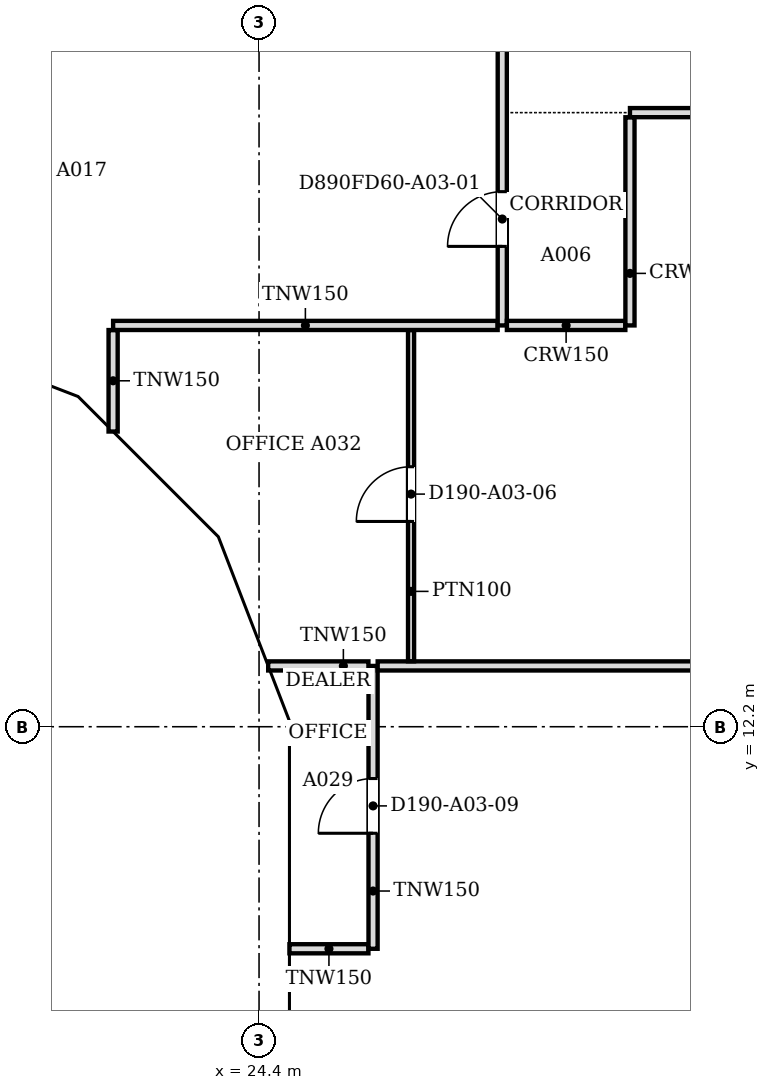
"""IFC4 building model, lengths in metres.
Left out: names, types, materials, properties, quantities, classifications, styles, units other than length and angle.
Written with IfcOpenShell. Run it as: python <this file> out.ifc"""

import sys

from ifc_helpers import new_model, si_unit, direction, frame, frame_2d, origin, place, context, subcontext, project, spatial, polyline, rectangle, outline, extrude, faceted_brep, source, transform, mapped, element, fill, save


model = new_model("IFC4")
c1 = context("Model", 3, precision=1e-05, world=origin(), true_north=direction((0.0, 1.0)))
c2 = subcontext(c1, "Body", "Model", "MODEL_VIEW")
j1 = project(units=[si_unit("LENGTHUNIT", "METRE"), si_unit("PLANEANGLEUNIT", "RADIAN")], contexts=[c1])
p1 = place(None, origin())
s1 = spatial("IfcSite", under=j1, at=p1, CompositionType="ELEMENT")
p2 = place(p1, origin())
s2 = spatial("IfcBuilding", under=s1, at=p2, CompositionType="ELEMENT")
p3 = place(p2, frame((0.0, 0.0, 37.2)))
s3 = spatial("IfcBuildingStorey", under=s2, at=p3, CompositionType="ELEMENT", Elevation=37.2)
m1 = source(origin(), c2, "Body", "Brep", [
    faceted_brep([(3.096, -0.25, 7.536), (0.047, -0.25, 3.856), (0.047, -0.25, 3.744), (3.096, -0.25, 0.064), (0.0, 0.25, 3.8), (3.149, 0.25, 7.6), (3.202, 0.25, 7.536), (3.202, 0.25, 0.064), (3.149, 0.25, 0.0), (3.149, -0.0, 0.0), (3.149, -0.0, 7.6), (0.0, 0.0, 3.8)], [[[0, 1, 2, 3]], [[4, 5, 6, 7, 8]], [[8, 7, 9]], [[6, 5, 10]], [[5, 4, 11, 1, 0, 10]], [[4, 8, 9, 3, 2, 11]], [[11, 2, 1]], [[3, 9, 7, 6, 10, 0]]]),
])
p4 = place(p3, frame((18.346, 18.55, -3.8), z_axis=(0.0, 0.0, 1.0), x_axis=(0.932985567668, -0.359913782069, 0.0)))
e1 = element("IfcWall", 1, at=p4, inside=s3, PredefinedType="SOLIDWALL", context=c2, shape_type="MappedRepresentation", body=[
    mapped(m1, transform((0.0, 0.0, 0.0), scale=1.0)),
])
m2 = source(origin(), c2, "Body", "SweptSolid", [
    extrude(outline(polyline([(2.949, 6.967), (0.325, 3.8), (2.949, 0.633), (2.949, 6.967)])), frame((0.0, 0.26, 0.0), z_axis=(0.0, -1.0, 0.0), x_axis=(1.0, 0.0, 0.0)), (0.0, 0.0, 1.0), 0.52),
])
p5 = place(p4, origin())
e2 = element("IfcOpeningElement", 2, at=p5, cuts=e1, PredefinedType="OPENING", context=c2, shape_type="MappedRepresentation", body=[
    mapped(m2, transform((0.0, 0.0, 0.0), scale=1.0)),
])
m3 = source(origin(), c2, "Body", "Brep", [
    faceted_brep([(0.106, -0.25, 0.064), (3.156, -0.25, 3.736), (3.156, -0.25, 3.864), (0.106, -0.25, 7.536), (0.0, 0.25, 7.536), (0.053, 0.25, 7.6), (3.209, 0.25, 3.8), (0.053, 0.25, 0.0), (0.0, 0.25, 0.064), (3.209, -0.0, 3.8), (0.053, 0.0, 0.0), (0.053, 0.0, 7.6)], [[[0, 1, 2, 3]], [[4, 5, 6, 7, 8]], [[7, 6, 9, 1, 0, 10]], [[6, 5, 11, 3, 2, 9]], [[5, 4, 11]], [[8, 7, 10]], [[8, 10, 0, 3, 11, 4]], [[1, 9, 2]]]),
])
p6 = place(p3, frame((21.248, 17.454, -3.8), z_axis=(0.0, 0.0, 1.0), x_axis=(0.707106781187, -0.707106781187, 0.0)))
e3 = element("IfcWall", 3, at=p6, inside=s3, PredefinedType="SOLIDWALL", context=c2, shape_type="MappedRepresentation", body=[
    mapped(m3, transform((0.0, 0.0, 0.0), scale=1.0)),
])
m4 = source(origin(), c2, "Body", "SweptSolid", [
    extrude(outline(polyline([(0.253, 0.632), (2.884, 3.8), (0.253, 6.968), (0.253, 0.632)])), frame((0.0, 0.26, 0.0), z_axis=(0.0, -1.0, 0.0), x_axis=(1.0, 0.0, 0.0)), (0.0, 0.0, 1.0), 0.52),
])
p7 = place(p6, origin())
e4 = element("IfcOpeningElement", 4, at=p7, cuts=e3, PredefinedType="OPENING", context=c2, shape_type="MappedRepresentation", body=[
    mapped(m4, transform((0.0, 0.0, 0.0), scale=1.0)),
])
m5 = source(origin(), c2, "Body", "Brep", [
    faceted_brep([(3.103, -0.25, 7.544), (0.053, -0.25, 3.864), (0.053, -0.25, 3.736), (3.103, -0.25, 0.056), (0.0, 0.25, 3.8), (3.149, 0.25, 7.6), (3.196, 0.25, 7.543), (3.196, 0.25, 0.057), (3.149, 0.25, 0.0), (3.149, -0.0, 0.0), (3.149, -0.0, 7.6), (0.0, 0.0, 3.8)], [[[0, 1, 2, 3]], [[4, 5, 6, 7, 8]], [[8, 7, 9]], [[6, 5, 10]], [[5, 4, 11, 1, 0, 10]], [[4, 8, 9, 3, 2, 11]], [[11, 2, 1]], [[3, 9, 7, 6, 10, 0]]]),
])
p8 = place(p3, frame((23.517, 15.185, -3.8), z_axis=(0.0, 0.0, 1.0), x_axis=(0.359864468756, -0.933004589553, 0.0)))
e5 = element("IfcWall", 5, at=p8, inside=s3, PredefinedType="SOLIDWALL", context=c2, shape_type="MappedRepresentation", body=[
    mapped(m5, transform((0.0, 0.0, 0.0), scale=1.0)),
])
p9 = place(p8, origin())
e6 = element("IfcOpeningElement", 6, at=p9, cuts=e5, PredefinedType="OPENING", context=c2, shape_type="MappedRepresentation", body=[
    mapped(m2, transform((0.0, 0.0, 0.0), scale=1.0)),
])
m6 = source(origin(), c2, "Body", "Brep", [
    faceted_brep([(0.093, -0.25, 0.057), (3.143, -0.25, 3.8), (0.093, -0.25, 7.543), (0.0, 0.25, 7.544), (0.047, 0.25, 7.6), (3.143, 0.25, 3.8), (0.047, 0.25, 0.0), (0.0, 0.25, 0.056), (0.047, 0.0, 0.0), (0.047, 0.0, 7.6)], [[[0, 1, 2]], [[3, 4, 5, 6, 7]], [[6, 5, 1, 0, 8]], [[5, 4, 9, 2, 1]], [[4, 3, 9]], [[7, 6, 8]], [[7, 8, 0, 2, 9, 3]]]),
])
p10 = place(p3, frame((24.65, 12.293, -3.8), z_axis=(0.0, 0.0, 1.0), x_axis=(0.0, -1.0, 0.0)))
e7 = element("IfcWall", 7, at=p10, inside=s3, PredefinedType="SOLIDWALL", context=c2, shape_type="MappedRepresentation", body=[
    mapped(m6, transform((0.0, 0.0, 0.0), scale=1.0)),
])
m7 = source(origin(), c2, "Body", "SweptSolid", [
    extrude(outline(polyline([(0.247, 0.641), (2.821, 3.8), (0.247, 6.959), (0.247, 0.641)])), frame((0.0, 0.26, 0.0), z_axis=(0.0, -1.0, 0.0), x_axis=(1.0, 0.0, 0.0)), (0.0, 0.0, 1.0), 0.52),
])
p11 = place(p10, origin())
e8 = element("IfcOpeningElement", 8, at=p11, cuts=e7, PredefinedType="OPENING", context=c2, shape_type="MappedRepresentation", body=[
    mapped(m7, transform((0.0, 0.0, 0.0), scale=1.0)),
])
m8 = source(origin(), c2, "Body", "Brep", [
    faceted_brep([(3.003, -0.25, 0.0), (3.05, -0.25, 0.06), (3.05, -0.25, 7.54), (3.003, -0.25, 7.6), (0.0, -0.25, 3.8), (0.0, 0.25, 3.8), (2.957, 0.25, 7.541), (2.957, 0.25, 0.059), (3.003, 0.0, 0.0), (3.003, 0.0, 7.6)], [[[0, 1, 2, 3, 4]], [[5, 6, 7]], [[1, 0, 8]], [[9, 3, 2]], [[6, 5, 4, 3, 9]], [[5, 7, 8, 0, 4]], [[1, 8, 7, 6, 9, 2]]]),
])
p12 = place(p3, frame((24.65, 9.15, -3.8), z_axis=(0.0, 0.0, 1.0), x_axis=(0.0, -1.0, 0.0)))
e9 = element("IfcWall", 9, at=p12, inside=s3, PredefinedType="SOLIDWALL", context=c2, shape_type="MappedRepresentation", body=[
    mapped(m8, transform((0.0, 0.0, 0.0), scale=1.0)),
])
m9 = source(origin(), c2, "Body", "SweptSolid", [
    extrude(outline(polyline([(2.803, 6.944), (0.319, 3.8), (2.803, 0.656), (2.803, 6.944)])), frame((0.0, 0.26, 0.0), z_axis=(0.0, -1.0, 0.0), x_axis=(1.0, 0.0, 0.0)), (0.0, 0.0, 1.0), 0.52),
])
p13 = place(p12, origin())
e10 = element("IfcOpeningElement", 10, at=p13, cuts=e9, PredefinedType="OPENING", context=c2, shape_type="MappedRepresentation", body=[
    mapped(m9, transform((0.0, 0.0, 0.0), scale=1.0)),
])
p14 = place(p2, frame((0.0, 0.0, 41.0)))
s4 = spatial("IfcBuildingStorey", under=s2, at=p14, CompositionType="ELEMENT", Elevation=41.0)
m10 = source(origin(), c2, "Body", "Brep", [
    faceted_brep([(0.093, -0.25, 0.056), (3.143, -0.25, 3.736), (3.143, -0.25, 3.864), (0.093, -0.25, 7.544), (0.0, 0.25, 7.543), (0.047, 0.25, 7.6), (3.196, 0.25, 3.8), (0.047, 0.25, 0.0), (0.0, 0.25, 0.057), (3.196, -0.0, 3.8), (0.047, 0.0, 0.0), (0.047, 0.0, 7.6)], [[[0, 1, 2, 3]], [[4, 5, 6, 7, 8]], [[7, 6, 9, 1, 0, 10]], [[6, 5, 11, 3, 2, 9]], [[5, 4, 11]], [[8, 7, 10]], [[8, 10, 0, 3, 11, 4]], [[1, 9, 2]]]),
])
p15 = place(p14, frame((18.303, 18.567, -3.8), z_axis=(0.0, 0.0, 1.0), x_axis=(0.932978940178, -0.359930961693, 0.0)))
e11 = element("IfcWall", 11, at=p15, inside=s4, PredefinedType="SOLIDWALL", context=c2, shape_type="MappedRepresentation", body=[
    mapped(m10, transform((0.0, 0.0, 0.0), scale=1.0)),
])
m11 = source(origin(), c2, "Body", "SweptSolid", [
    extrude(outline(polyline([(0.247, 0.633), (2.871, 3.8), (0.247, 6.967), (0.247, 0.633)])), frame((0.0, 0.26, 0.0), z_axis=(0.0, -1.0, 0.0), x_axis=(1.0, 0.0, 0.0)), (0.0, 0.0, 1.0), 0.52),
])
p16 = place(p15, origin())
e12 = element("IfcOpeningElement", 12, at=p16, cuts=e11, PredefinedType="OPENING", context=c2, shape_type="MappedRepresentation", body=[
    mapped(m11, transform((0.0, 0.0, 0.0), scale=1.0)),
])
m12 = source(origin(), c2, "Body", "Brep", [
    faceted_brep([(3.103, -0.25, 7.536), (0.053, -0.25, 3.864), (0.053, -0.25, 3.736), (3.103, -0.25, 0.064), (0.0, 0.25, 3.8), (3.156, 0.25, 7.6), (3.209, 0.25, 7.536), (3.209, 0.25, 0.064), (3.156, 0.25, 0.0), (3.156, -0.0, 0.0), (3.156, -0.0, 7.6), (0.0, 0.0, 3.8)], [[[0, 1, 2, 3]], [[4, 5, 6, 7, 8]], [[8, 7, 9]], [[6, 5, 10]], [[5, 4, 11, 1, 0, 10]], [[4, 8, 9, 3, 2, 11]], [[11, 2, 1]], [[3, 9, 7, 6, 10, 0]]]),
])
p17 = place(p14, frame((21.285, 17.417, -3.8), z_axis=(0.0, 0.0, 1.0), x_axis=(0.707106781187, -0.707106781187, 0.0)))
e13 = element("IfcWall", 13, at=p17, inside=s4, PredefinedType="SOLIDWALL", context=c2, shape_type="MappedRepresentation", body=[
    mapped(m12, transform((0.0, 0.0, 0.0), scale=1.0)),
])
m13 = source(origin(), c2, "Body", "SweptSolid", [
    extrude(outline(polyline([(2.956, 6.968), (0.325, 3.8), (2.956, 0.632), (2.956, 6.968)])), frame((0.0, 0.26, 0.0), z_axis=(0.0, -1.0, 0.0), x_axis=(1.0, 0.0, 0.0)), (0.0, 0.0, 1.0), 0.52),
])
p18 = place(p17, origin())
e14 = element("IfcOpeningElement", 14, at=p18, cuts=e13, PredefinedType="OPENING", context=c2, shape_type="MappedRepresentation", body=[
    mapped(m13, transform((0.0, 0.0, 0.0), scale=1.0)),
])
m14 = source(origin(), c2, "Body", "Brep", [
    faceted_brep([(0.106, -0.25, 0.064), (3.156, -0.25, 3.744), (3.156, -0.25, 3.856), (0.106, -0.25, 7.536), (0.0, 0.25, 7.536), (0.053, 0.25, 7.6), (3.202, 0.25, 3.8), (0.053, 0.25, 0.0), (0.0, 0.25, 0.064), (3.202, -0.0, 3.8), (0.053, 0.0, 0.0), (0.053, 0.0, 7.6)], [[[0, 1, 2, 3]], [[4, 5, 6, 7, 8]], [[7, 6, 9, 1, 0, 10]], [[6, 5, 11, 3, 2, 9]], [[5, 4, 11]], [[8, 7, 10]], [[8, 10, 0, 3, 11, 4]], [[1, 9, 2]]]),
])
p19 = place(p14, frame((23.497, 15.234, -3.8), z_axis=(0.0, 0.0, 1.0), x_axis=(0.359913782069, -0.932985567668, 0.0)))
e15 = element("IfcWall", 15, at=p19, inside=s4, PredefinedType="SOLIDWALL", context=c2, shape_type="MappedRepresentation", body=[
    mapped(m14, transform((0.0, 0.0, 0.0), scale=1.0)),
])
m15 = source(origin(), c2, "Body", "SweptSolid", [
    extrude(outline(polyline([(0.253, 0.633), (2.878, 3.8), (0.253, 6.967), (0.253, 0.633)])), frame((0.0, 0.26, 0.0), z_axis=(0.0, -1.0, 0.0), x_axis=(1.0, 0.0, 0.0)), (0.0, 0.0, 1.0), 0.52),
])
p20 = place(p19, origin())
e16 = element("IfcOpeningElement", 16, at=p20, cuts=e15, PredefinedType="OPENING", context=c2, shape_type="MappedRepresentation", body=[
    mapped(m15, transform((0.0, 0.0, 0.0), scale=1.0)),
])
m16 = source(origin(), c2, "Body", "Brep", [
    faceted_brep([(3.096, -0.25, 0.0), (6.1, -0.25, 3.8), (3.096, -0.25, 7.6), (0.047, -0.25, 3.857), (0.047, -0.25, 3.743), (0.0, 0.25, 3.8), (3.096, 0.25, 7.6), (6.053, 0.25, 3.859), (6.053, 0.25, 3.741), (3.096, 0.25, 0.0), (6.1, -0.0, 3.8), (0.0, 0.0, 3.8)], [[[0, 1, 2, 3, 4]], [[5, 6, 7, 8, 9]], [[9, 8, 10, 1, 0]], [[7, 6, 2, 1, 10]], [[6, 5, 11, 3, 2]], [[5, 9, 0, 4, 11]], [[11, 4, 3]], [[10, 8, 7]]]),
])
p21 = place(p14, frame((24.65, 12.247, -3.8), z_axis=(0.0, 0.0, 1.0), x_axis=(0.0, -1.0, 0.0)))
e17 = element("IfcWall", 17, at=p21, inside=s4, PredefinedType="SOLIDWALL", context=c2, shape_type="MappedRepresentation", body=[
    mapped(m16, transform((0.0, 0.0, 0.0), scale=1.0)),
])
m17 = source(origin(), c2, "Body", "SweptSolid", [
    extrude(outline(polyline([(3.094, 0.399), (5.781, 3.8), (3.094, 7.201), (0.323, 3.8), (3.094, 0.399)])), frame((0.0, 0.26, 0.0), z_axis=(0.0, -1.0, 0.0), x_axis=(1.0, 0.0, 0.0)), (0.0, 0.0, 1.0), 0.52),
])
p22 = place(p21, origin())
e18 = element("IfcOpeningElement", 18, at=p22, cuts=e17, PredefinedType="OPENING", context=c2, shape_type="MappedRepresentation", body=[
    mapped(m17, transform((0.0, 0.0, 0.0), scale=1.0)),
])
p23 = place(p3, frame((24.9, 8.548, 0.0), z_axis=(0.0, 0.0, 1.0), x_axis=(1.0, 0.0, 0.0)))
e19 = element("IfcWall", 19, at=p23, inside=s3, PredefinedType="PARTITIONING", context=c2, shape_type="SweptSolid", body=[
    extrude(rectangle(XDim=1.299, YDim=0.15, at=frame_2d((0.649, 0.0))), origin(), (0.0, 0.0, 1.0), 3.067),
])
p24 = place(p3, frame((26.275, 8.548, 0.0), z_axis=(0.0, 0.0, 1.0), x_axis=(0.0, 1.0, 0.0)))
e20 = element("IfcWall", 20, at=p24, inside=s3, PredefinedType="PARTITIONING", context=c2, shape_type="SweptSolid", body=[
    extrude(rectangle(XDim=4.652, YDim=0.15, at=frame_2d((2.326, 0.0))), origin(), (0.0, 0.0, 1.0), 3.067),
])
m18 = source(origin(), c2, "Body", "SweptSolid", [
    extrude(rectangle(XDim=0.9, YDim=2.1, at=frame_2d((0.45, 1.05))), frame((0.0, 0.085, 0.0), z_axis=(0.0, -1.0, 0.0), x_axis=(1.0, 0.0, 0.0)), (0.0, 0.0, 1.0), 0.17),
])
p25 = place(p24, frame((1.9, 0.0, 0.0)))
e21 = element("IfcOpeningElement", 21, at=p25, cuts=e20, PredefinedType="OPENING", context=c2, shape_type="MappedRepresentation", body=[
    mapped(m18, transform((0.0, 0.0, 0.0), scale=1.0)),
])
p26 = place(p3, frame((24.55, 13.2, 0.0), z_axis=(0.0, 0.0, 1.0), x_axis=(1.0, 0.0, 0.0)))
e22 = element("IfcWall", 22, at=p26, inside=s3, PredefinedType="PARTITIONING", context=c2, shape_type="SweptSolid", body=[
    extrude(rectangle(XDim=1.649, YDim=0.15, at=frame_2d((0.824, 0.0))), origin(), (0.0, 0.0, 1.0), 3.067),
])
p27 = place(p3, frame((26.351, 13.2, 0.0), z_axis=(0.0, 0.0, 1.0), x_axis=(1.0, 0.0, 0.0)))
e23 = element("IfcWall", 23, at=p27, inside=s3, PredefinedType="PARTITIONING", context=c2, shape_type="SweptSolid", body=[
    extrude(rectangle(XDim=18.573, YDim=0.15, at=frame_2d((9.287, 0.0))), origin(), (0.0, 0.0, 1.0), 3.067),
])
p28 = place(p3, frame((26.9, 13.276, 0.0), z_axis=(0.0, 0.0, 1.0), x_axis=(0.0, 1.0, 0.0)))
e24 = element("IfcWall", 24, at=p28, inside=s3, PredefinedType="PARTITIONING", context=c2, shape_type="SweptSolid", body=[
    extrude(rectangle(XDim=5.448, YDim=0.1, at=frame_2d((2.724, 0.0))), origin(), (0.0, 0.0, 1.0), 3.067),
])
m19 = source(origin(), c2, "Body", "SweptSolid", [
    extrude(rectangle(XDim=0.9, YDim=2.1, at=frame_2d((0.45, 1.05))), frame((0.0, 0.06, 0.0), z_axis=(0.0, -1.0, 0.0), x_axis=(1.0, 0.0, 0.0)), (0.0, 0.0, 1.0), 0.12),
])
p29 = place(p28, frame((2.3, 0.0, 0.0)))
e25 = element("IfcOpeningElement", 25, at=p29, cuts=e24, PredefinedType="OPENING", context=c2, shape_type="MappedRepresentation", body=[
    mapped(m19, transform((0.0, 0.0, 0.0), scale=1.0)),
])
p30 = place(p3, frame((22.0, 17.055, 0.0), z_axis=(0.0, 0.0, 1.0), x_axis=(0.0, 1.0, 0.0)))
e26 = element("IfcWall", 26, at=p30, inside=s3, PredefinedType="PARTITIONING", context=c2, shape_type="SweptSolid", body=[
    extrude(rectangle(XDim=1.669, YDim=0.15, at=frame_2d((0.834, 0.0))), origin(), (0.0, 0.0, 1.0), 3.067),
])
p31 = place(p3, frame((22.0, 18.8, 0.0), z_axis=(0.0, 0.0, 1.0), x_axis=(1.0, 0.0, 0.0)))
e27 = element("IfcWall", 27, at=p31, inside=s3, PredefinedType="PARTITIONING", context=c2, shape_type="SweptSolid", body=[
    extrude(rectangle(XDim=6.324, YDim=0.15, at=frame_2d((3.162, 0.0))), origin(), (0.0, 0.0, 1.0), 3.067),
])
p32 = place(p3, frame((28.4, 18.8, 0.0), z_axis=(0.0, 0.0, 1.0), x_axis=(0.0, 1.0, 0.0)))
e28 = element("IfcWall", 28, at=p32, inside=s3, PredefinedType="PARTITIONING", context=c2, shape_type="SweptSolid", body=[
    extrude(rectangle(XDim=26.824, YDim=0.15, at=frame_2d((13.412, 0.0))), origin(), (0.0, 0.0, 1.0), 3.067),
])
p33 = place(p32, frame((1.3, 0.0, 0.0)))
e29 = element("IfcOpeningElement", 29, at=p33, cuts=e28, PredefinedType="OPENING", context=c2, shape_type="MappedRepresentation", body=[
    mapped(m18, transform((0.0, 0.0, 0.0), scale=1.0)),
])
p34 = place(p32, frame((14.301, 0.0, 0.0)))
e30 = element("IfcOpeningElement", 30, at=p34, cuts=e28, PredefinedType="OPENING", context=c2, shape_type="MappedRepresentation", body=[
    mapped(m18, transform((0.0, 0.0, 0.0), scale=1.0)),
])
p35 = place(p32, frame((8.2, 0.0, 0.0)))
e31 = element("IfcOpeningElement", 31, at=p35, cuts=e28, PredefinedType="OPENING", context=c2, shape_type="MappedRepresentation", body=[
    mapped(m18, transform((0.0, 0.0, 0.0), scale=1.0)),
])
p36 = place(p32, frame((21.9, 0.0, 0.0)))
e32 = element("IfcOpeningElement", 32, at=p36, cuts=e28, PredefinedType="OPENING", context=c2, shape_type="MappedRepresentation", body=[
    mapped(m18, transform((0.0, 0.0, 0.0), scale=1.0)),
])
p37 = place(p3, frame((28.476, 18.8, 0.0), z_axis=(0.0, 0.0, 1.0), x_axis=(1.0, 0.0, 0.0)))
e33 = element("IfcWall", 33, at=p37, inside=s3, PredefinedType="PARTITIONING", context=c2, shape_type="SweptSolid", body=[
    extrude(rectangle(XDim=1.948, YDim=0.15, at=frame_2d((0.974, 0.0))), origin(), (0.0, 0.0, 1.0), 3.067),
])
p38 = place(p3, frame((30.5, 18.8, 0.0), z_axis=(0.0, 0.0, 1.0), x_axis=(0.0, 1.0, 0.0)))
e34 = element("IfcWall", 34, at=p38, inside=s3, PredefinedType="PARTITIONING", context=c2, shape_type="SweptSolid", body=[
    extrude(rectangle(XDim=3.424, YDim=0.15, at=frame_2d((1.712, 0.0))), origin(), (0.0, 0.0, 1.0), 3.067),
])
p39 = place(p3, frame((30.5, 22.3, 0.0), z_axis=(0.0, 0.0, 1.0), x_axis=(1.0, 0.0, 0.0)))
e35 = element("IfcWall", 35, at=p39, inside=s3, PredefinedType="PARTITIONING", context=c2, shape_type="SweptSolid", body=[
    extrude(rectangle(XDim=14.5, YDim=0.15, at=frame_2d((7.25, 0.0))), origin(), (0.0, 0.0, 1.0), 3.067),
])
m20 = source(origin(), c2, "Body", "SweptSolid", [
    extrude(rectangle(XDim=0.9, YDim=2.1, at=frame_2d((0.45, 1.05))), frame((0.0, 0.025, 0.0), z_axis=(0.0, -1.0, 0.0), x_axis=(1.0, 0.0, 0.0)), (0.0, 0.0, 1.0), 0.05),
])
p40 = place(p33, origin())
e36 = element("IfcDoor", 36, at=p40, inside=s3, OperationType="SINGLE_SWING_LEFT", PredefinedType="DOOR", context=c2, shape_type="MappedRepresentation", body=[
    mapped(m20, transform((0.0, 0.0, 0.0), scale=1.0)),
])
fill(e29, e36)
p41 = place(p29, origin())
e37 = element("IfcDoor", 37, at=p41, inside=s3, OperationType="SINGLE_SWING_LEFT", PredefinedType="DOOR", context=c2, shape_type="MappedRepresentation", body=[
    mapped(m20, transform((0.0, 0.0, 0.0), scale=1.0)),
])
fill(e25, e37)
p42 = place(p25, origin())
e38 = element("IfcDoor", 38, at=p42, inside=s3, OperationType="SINGLE_SWING_LEFT", PredefinedType="DOOR", context=c2, shape_type="MappedRepresentation", body=[
    mapped(m20, transform((0.0, 0.0, 0.0), scale=1.0)),
])
fill(e21, e38)
save(model, sys.argv[1])
